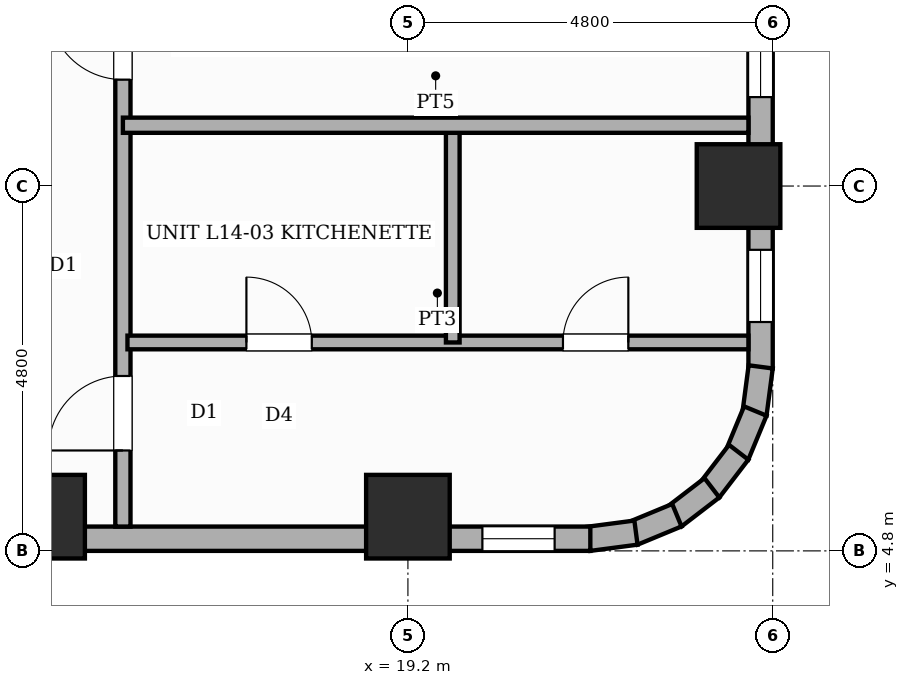
"""IFC4 building model, lengths in metres.
Left out: names, types, materials, properties, quantities, classifications, styles, units other than length and angle.
Written with IfcOpenShell. Run it as: python <this file> out.ifc"""

import sys

from ifc_helpers import new_model, si_unit, direction, frame, frame_2d, origin, origin_2d, place, context, subcontext, project, spatial, rectangle, extrude, element, fill, save


model = new_model("IFC4")
c1 = context("Model", 3, precision=1e-05, world=origin(), true_north=direction((0.0, 1.0)))
c2 = subcontext(c1, "Body", "Model", "MODEL_VIEW")
j1 = project(units=[si_unit("LENGTHUNIT", "METRE"), si_unit("PLANEANGLEUNIT", "RADIAN")], contexts=[c1])
p1 = place(None, origin())
s1 = spatial("IfcSite", under=j1, at=p1, CompositionType="ELEMENT")
p2 = place(p1, origin())
s2 = spatial("IfcBuilding", under=s1, at=p2, CompositionType="ELEMENT")
p3 = place(p2, frame((0.0, 0.0, 57.4)))
s3 = spatial("IfcBuildingStorey", under=s2, at=p3, CompositionType="ELEMENT", Elevation=57.4)
for number, where, z_axis, x_axis in (
    (1, (14.4, 5.25, 0.0), (0.0, 0.0, 1.0), (1.0, 0.0, 0.0)),
    (2, (19.2, 5.25, 0.0), (0.0, 0.0, 1.0), (1.0, 0.0, 0.0)),
    (3, (23.55, 9.6, 0.0), (0.0, 0.0, 1.0), (1.0, 0.0, 0.0)),
):
    element("IfcColumn", number, at=place(p3, frame(where, z_axis=z_axis, x_axis=x_axis)), inside=s3, PredefinedType="COLUMN", context=c2, shape_type="SweptSolid", body=[
        extrude(rectangle(XDim=1.1, YDim=1.1, at=origin_2d()), origin(), (0.0, 0.0, 1.0), 3.6),
    ])
p4 = place(p3, frame((23.84, 26.4, 0.0), z_axis=(0.0, 0.0, 1.0), x_axis=(0.0, -1.0, 0.0)))
e4 = element("IfcWall", 4, at=p4, inside=s3, PredefinedType="STANDARD", context=c2, shape_type="SweptSolid", body=[
    extrude(rectangle(XDim=19.2, YDim=0.32, at=frame_2d((9.6, 0.0))), origin(), (0.0, 0.0, 1.0), 2.53),
])
p5 = place(p4, frame((14.23, 0.0, 0.65)))
e5 = element("IfcOpeningElement", 5, at=p5, cuts=e4, PredefinedType="OPENING", context=c2, shape_type="SweptSolid", body=[
    extrude(rectangle(XDim=1.4, YDim=1.1, at=frame_2d((0.7, 0.55))), frame((0.0, 0.17, 0.0), z_axis=(0.0, -1.0, 0.0), x_axis=(1.0, 0.0, 0.0)), (0.0, 0.0, 1.0), 0.34),
])
p6 = place(p4, frame((8.83, 0.0, 0.65)))
e6 = element("IfcOpeningElement", 6, at=p6, cuts=e4, PredefinedType="OPENING", context=c2, shape_type="SweptSolid", body=[
    extrude(rectangle(XDim=1.4, YDim=1.1, at=frame_2d((0.7, 0.55))), frame((0.0, 0.17, 0.0), z_axis=(0.0, -1.0, 0.0), x_axis=(1.0, 0.0, 0.0)), (0.0, 0.0, 1.0), 0.34),
])
p7 = place(p4, frame((3.83, 0.0, 0.65)))
e7 = element("IfcOpeningElement", 7, at=p7, cuts=e4, PredefinedType="OPENING", context=c2, shape_type="SweptSolid", body=[
    extrude(rectangle(XDim=1.4, YDim=1.1, at=frame_2d((0.7, 0.55))), frame((0.0, 0.17, 0.0), z_axis=(0.0, -1.0, 0.0), x_axis=(1.0, 0.0, 0.0)), (0.0, 0.0, 1.0), 0.34),
])
p8 = place(p4, frame((17.639, 0.0, 0.45)))
e8 = element("IfcOpeningElement", 8, at=p8, cuts=e4, PredefinedType="OPENING", context=c2, shape_type="SweptSolid", body=[
    extrude(rectangle(XDim=0.95, YDim=1.8, at=frame_2d((0.475, 0.9))), frame((0.0, 0.17, 0.0), z_axis=(0.0, -1.0, 0.0), x_axis=(1.0, 0.0, 0.0)), (0.0, 0.0, 1.0), 0.34),
])
p9 = place(p4, frame((12.84, 0.0, 0.45)))
e9 = element("IfcOpeningElement", 9, at=p9, cuts=e4, PredefinedType="OPENING", context=c2, shape_type="SweptSolid", body=[
    extrude(rectangle(XDim=0.75, YDim=1.8, at=frame_2d((0.375, 0.9))), frame((0.0, 0.17, 0.0), z_axis=(0.0, -1.0, 0.0), x_axis=(1.0, 0.0, 0.0)), (0.0, 0.0, 1.0), 0.34),
])
p10 = place(p4, frame((5.815, 0.0, 0.45)))
e10 = element("IfcOpeningElement", 10, at=p10, cuts=e4, PredefinedType="OPENING", context=c2, shape_type="SweptSolid", body=[
    extrude(rectangle(XDim=0.6, YDim=1.8, at=frame_2d((0.3, 0.9))), frame((0.0, 0.17, 0.0), z_axis=(0.0, -1.0, 0.0), x_axis=(1.0, 0.0, 0.0)), (0.0, 0.0, 1.0), 0.34),
])
p11 = place(p4, frame((0.88, 0.0, 0.45)))
e11 = element("IfcOpeningElement", 11, at=p11, cuts=e4, PredefinedType="OPENING", context=c2, shape_type="SweptSolid", body=[
    extrude(rectangle(XDim=0.75, YDim=1.8, at=frame_2d((0.375, 0.9))), frame((0.0, 0.17, 0.0), z_axis=(0.0, -1.0, 0.0), x_axis=(1.0, 0.0, 0.0)), (0.0, 0.0, 1.0), 0.34),
])
p12 = place(p3, frame((23.841, 7.221, 0.0), z_axis=(0.0, 0.0, 1.0), x_axis=(-0.130504898859, -0.991447664465, 0.0)))
e12 = element("IfcWall", 12, at=p12, inside=s3, PredefinedType="STANDARD", context=c2, shape_type="SweptSolid", body=[
    extrude(rectangle(XDim=0.627, YDim=0.32, at=frame_2d((0.313, 0.0))), origin(), (0.0, 0.0, 1.0), 3.35),
])
p13 = place(p3, frame((23.771, 6.64, 0.0), z_axis=(0.0, 0.0, 1.0), x_axis=(-0.382787856107, -0.923836271867, 0.0)))
e13 = element("IfcWall", 13, at=p13, inside=s3, PredefinedType="STANDARD", context=c2, shape_type="SweptSolid", body=[
    extrude(rectangle(XDim=0.626, YDim=0.32, at=frame_2d((0.313, 0.0))), origin(), (0.0, 0.0, 1.0), 3.35),
])
p14 = place(p3, frame((23.552, 6.097, 0.0), z_axis=(0.0, 0.0, 1.0), x_axis=(-0.608693302629, -0.793405610854, 0.0)))
e14 = element("IfcWall", 14, at=p14, inside=s3, PredefinedType="STANDARD", context=c2, shape_type="SweptSolid", body=[
    extrude(rectangle(XDim=0.626, YDim=0.32, at=frame_2d((0.313, 0.0))), origin(), (0.0, 0.0, 1.0), 3.35),
])
p15 = place(p3, frame((23.2, 5.63, 0.0), z_axis=(0.0, 0.0, 1.0), x_axis=(-0.7932174212, -0.608938521285, 0.0)))
e15 = element("IfcWall", 15, at=p15, inside=s3, PredefinedType="STANDARD", context=c2, shape_type="SweptSolid", body=[
    extrude(rectangle(XDim=0.627, YDim=0.32, at=frame_2d((0.313, 0.0))), origin(), (0.0, 0.0, 1.0), 3.35),
])
for number, where, z_axis, x_axis in (
    (16, (22.739, 5.269, 0.0), (0.0, 0.0, 1.0), (-0.924, -0.383, 0.0)),
    (17, (22.2, 5.04, 0.0), (0.0, 0.0, 1.0), (-0.991, -0.131, 0.0)),
):
    element("IfcWall", number, at=place(p3, frame(where, z_axis=z_axis, x_axis=x_axis)), inside=s3, PredefinedType="STANDARD", context=c2, shape_type="SweptSolid", body=[
        extrude(rectangle(XDim=0.626, YDim=0.32, at=frame_2d((0.313, 0.0))), origin(), (0.0, 0.0, 1.0), 3.35),
    ])
p16 = place(p3, frame((21.6, 4.96, 0.0), z_axis=(0.0, 0.0, 1.0), x_axis=(-1.0, 0.0, 0.0)))
e18 = element("IfcWall", 18, at=p16, inside=s3, PredefinedType="STANDARD", context=c2, shape_type="SweptSolid", body=[
    extrude(rectangle(XDim=14.4, YDim=0.32, at=frame_2d((7.2, 0.0))), origin(), (0.0, 0.0, 1.0), 2.53),
])
p17 = place(p16, frame((0.47, 0.0, 0.45)))
e19 = element("IfcOpeningElement", 19, at=p17, cuts=e18, PredefinedType="OPENING", context=c2, shape_type="SweptSolid", body=[
    extrude(rectangle(XDim=0.95, YDim=1.8, at=frame_2d((0.475, 0.9))), frame((0.0, 0.17, 0.0), z_axis=(0.0, -1.0, 0.0), x_axis=(1.0, 0.0, 0.0)), (0.0, 0.0, 1.0), 0.34),
])
p18 = place(p16, frame((9.015, 0.0, 0.65)))
e20 = element("IfcOpeningElement", 20, at=p18, cuts=e18, PredefinedType="OPENING", context=c2, shape_type="SweptSolid", body=[
    extrude(rectangle(XDim=1.4, YDim=1.1, at=frame_2d((0.7, 0.55))), frame((0.0, 0.17, 0.0), z_axis=(0.0, -1.0, 0.0), x_axis=(1.0, 0.0, 0.0)), (0.0, 0.0, 1.0), 0.34),
])
p19 = place(p3, frame((15.45, 5.12, 0.0), z_axis=(0.0, 0.0, 1.0), x_axis=(0.0, 1.0, 0.0)))
e21 = element("IfcWall", 21, at=p19, inside=s3, PredefinedType="PARTITIONING", context=c2, shape_type="SweptSolid", body=[
    extrude(rectangle(XDim=20.63, YDim=0.2, at=frame_2d((10.315, 0.0))), origin(), (0.0, 0.0, 1.0), 3.35),
])
p20 = place(p19, frame((1.001, 0.0, 0.0)))
e22 = element("IfcOpeningElement", 22, at=p20, cuts=e21, PredefinedType="OPENING", context=c2, shape_type="SweptSolid", body=[
    extrude(rectangle(XDim=0.98, YDim=2.18, at=frame_2d((0.49, 1.09))), frame((0.0, 0.11, 0.0), z_axis=(0.0, -1.0, 0.0), x_axis=(1.0, 0.0, 0.0)), (0.0, 0.0, 1.0), 0.22),
])
p21 = place(p19, frame((5.88, 0.0, 0.0)))
e23 = element("IfcOpeningElement", 23, at=p21, cuts=e21, PredefinedType="OPENING", context=c2, shape_type="SweptSolid", body=[
    extrude(rectangle(XDim=0.98, YDim=2.18, at=frame_2d((0.49, 1.09))), frame((0.0, 0.11, 0.0), z_axis=(0.0, -1.0, 0.0), x_axis=(1.0, 0.0, 0.0)), (0.0, 0.0, 1.0), 0.22),
])
p22 = place(p19, frame((11.28, 0.0, 0.0)))
e24 = element("IfcOpeningElement", 24, at=p22, cuts=e21, PredefinedType="OPENING", context=c2, shape_type="SweptSolid", body=[
    extrude(rectangle(XDim=0.98, YDim=2.18, at=frame_2d((0.49, 1.09))), frame((0.0, 0.11, 0.0), z_axis=(0.0, -1.0, 0.0), x_axis=(1.0, 0.0, 0.0)), (0.0, 0.0, 1.0), 0.22),
])
p23 = place(p19, frame((16.28, 0.0, 0.0)))
e25 = element("IfcOpeningElement", 25, at=p23, cuts=e21, PredefinedType="OPENING", context=c2, shape_type="SweptSolid", body=[
    extrude(rectangle(XDim=0.98, YDim=2.18, at=frame_2d((0.49, 1.09))), frame((0.0, 0.11, 0.0), z_axis=(0.0, -1.0, 0.0), x_axis=(1.0, 0.0, 0.0)), (0.0, 0.0, 1.0), 0.22),
])
p24 = place(p3, frame((15.51, 7.542, 0.0), z_axis=(0.0, 0.0, 1.0), x_axis=(1.0, 0.0, 0.0)))
e26 = element("IfcWall", 26, at=p24, inside=s3, PredefinedType="PLUMBINGWALL", context=c2, shape_type="SweptSolid", body=[
    extrude(rectangle(XDim=8.17, YDim=0.18, at=frame_2d((4.085, 0.0))), origin(), (0.0, 0.0, 1.0), 3.35),
])
p25 = place(p24, frame((1.565, 0.0, 0.0)))
e27 = element("IfcOpeningElement", 27, at=p25, cuts=e26, PredefinedType="OPENING", context=c2, shape_type="SweptSolid", body=[
    extrude(rectangle(XDim=0.86, YDim=2.1, at=frame_2d((0.43, 1.05))), frame((0.0, 0.1, 0.0), z_axis=(0.0, -1.0, 0.0), x_axis=(1.0, 0.0, 0.0)), (0.0, 0.0, 1.0), 0.2),
])
p26 = place(p24, frame((5.73, 0.0, 0.0)))
e28 = element("IfcOpeningElement", 28, at=p26, cuts=e26, PredefinedType="OPENING", context=c2, shape_type="SweptSolid", body=[
    extrude(rectangle(XDim=0.86, YDim=2.1, at=frame_2d((0.43, 1.05))), frame((0.0, 0.1, 0.0), z_axis=(0.0, -1.0, 0.0), x_axis=(1.0, 0.0, 0.0)), (0.0, 0.0, 1.0), 0.2),
])
p27 = place(p3, frame((19.79, 7.542, 0.0), z_axis=(0.0, 0.0, 1.0), x_axis=(0.0, 1.0, 0.0)))
e29 = element("IfcWall", 29, at=p27, inside=s3, PredefinedType="PLUMBINGWALL", context=c2, shape_type="SweptSolid", body=[
    extrude(rectangle(XDim=2.898, YDim=0.18, at=frame_2d((1.449, 0.0))), origin(), (0.0, 0.0, 1.0), 3.35),
])
p28 = place(p3, frame((15.45, 10.4, 0.0), z_axis=(0.0, 0.0, 1.0), x_axis=(1.0, 0.0, 0.0)))
e30 = element("IfcWall", 30, at=p28, inside=s3, PredefinedType="SOLIDWALL", context=c2, shape_type="SweptSolid", body=[
    extrude(rectangle(XDim=8.23, YDim=0.2, at=frame_2d((4.115, 0.0))), origin(), (0.0, 0.0, 1.0), 3.35),
])
p29 = place(p5, origin())
e31 = element("IfcWindow", 31, at=p29, inside=s3, PartitioningType="SINGLE_PANEL", PredefinedType="WINDOW", context=c2, shape_type="SweptSolid", body=[
    extrude(rectangle(XDim=1.4, YDim=1.1, at=frame_2d((0.7, 0.55))), frame((0.0, 0.03, 0.0), z_axis=(0.0, -1.0, 0.0), x_axis=(1.0, 0.0, 0.0)), (0.0, 0.0, 1.0), 0.06),
])
fill(e5, e31)
p30 = place(p8, origin())
e32 = element("IfcWindow", 32, at=p30, inside=s3, PartitioningType="SINGLE_PANEL", PredefinedType="WINDOW", context=c2, shape_type="SweptSolid", body=[
    extrude(rectangle(XDim=0.95, YDim=1.8, at=frame_2d((0.475, 0.9))), frame((0.0, 0.03, 0.0), z_axis=(0.0, -1.0, 0.0), x_axis=(1.0, 0.0, 0.0)), (0.0, 0.0, 1.0), 0.06),
])
fill(e8, e32)
p31 = place(p17, origin())
e33 = element("IfcWindow", 33, at=p31, inside=s3, PartitioningType="SINGLE_PANEL", PredefinedType="WINDOW", context=c2, shape_type="SweptSolid", body=[
    extrude(rectangle(XDim=0.95, YDim=1.8, at=frame_2d((0.475, 0.9))), frame((0.0, 0.03, 0.0), z_axis=(0.0, -1.0, 0.0), x_axis=(1.0, 0.0, 0.0)), (0.0, 0.0, 1.0), 0.06),
])
fill(e19, e33)
p32 = place(p20, origin())
e34 = element("IfcDoor", 34, at=p32, inside=s3, OperationType="SINGLE_SWING_LEFT", PredefinedType="DOOR", context=c2, shape_type="SweptSolid", body=[
    extrude(rectangle(XDim=0.98, YDim=2.18, at=frame_2d((0.49, 1.09))), frame((0.0, 0.025, 0.0), z_axis=(0.0, -1.0, 0.0), x_axis=(1.0, 0.0, 0.0)), (0.0, 0.0, 1.0), 0.05),
])
fill(e22, e34)
p33 = place(p25, origin())
e35 = element("IfcDoor", 35, at=p33, inside=s3, OperationType="SINGLE_SWING_LEFT", PredefinedType="DOOR", context=c2, shape_type="SweptSolid", body=[
    extrude(rectangle(XDim=0.86, YDim=2.1, at=frame_2d((0.43, 1.05))), frame((0.0, 0.025, 0.0), z_axis=(0.0, -1.0, 0.0), x_axis=(1.0, 0.0, 0.0)), (0.0, 0.0, 1.0), 0.05),
])
fill(e27, e35)
p34 = place(p26, origin())
e36 = element("IfcDoor", 36, at=p34, inside=s3, OperationType="SINGLE_SWING_RIGHT", PredefinedType="DOOR", context=c2, shape_type="SweptSolid", body=[
    extrude(rectangle(XDim=0.86, YDim=2.1, at=frame_2d((0.43, 1.05))), frame((0.0, 0.025, 0.0), z_axis=(0.0, -1.0, 0.0), x_axis=(1.0, 0.0, 0.0)), (0.0, 0.0, 1.0), 0.05),
])
fill(e28, e36)
p35 = place(p21, origin())
e37 = element("IfcDoor", 37, at=p35, inside=s3, OperationType="SINGLE_SWING_RIGHT", PredefinedType="DOOR", context=c2, shape_type="SweptSolid", body=[
    extrude(rectangle(XDim=0.98, YDim=2.18, at=frame_2d((0.49, 1.09))), frame((0.0, 0.025, 0.0), z_axis=(0.0, -1.0, 0.0), x_axis=(1.0, 0.0, 0.0)), (0.0, 0.0, 1.0), 0.05),
])
fill(e23, e37)
save(model, sys.argv[1])
